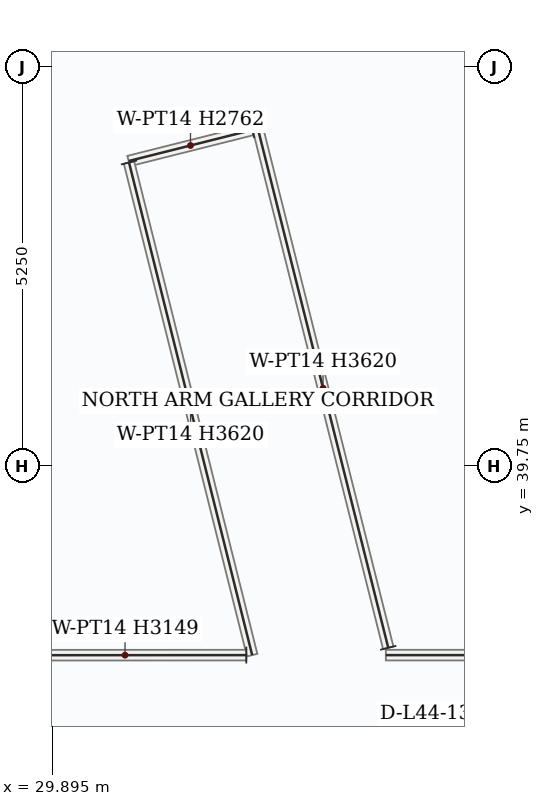
"""IFC4 building model, lengths in metres.
Left out: names, types, materials, properties, quantities, classifications, styles, units other than length and angle.
Written with IfcOpenShell. Run it as: python <this file> out.ifc"""

import sys

from ifc_helpers import new_model, si_unit, direction, frame, frame_2d, origin, place, context, subcontext, project, spatial, rectangle, extrude, source, transform, mapped, element, save


model = new_model("IFC4")
c1 = context("Model", 3, precision=1e-05, world=origin(), true_north=direction((0.0, 1.0)))
c2 = subcontext(c1, "Body", "Model", "MODEL_VIEW")
j1 = project(units=[si_unit("LENGTHUNIT", "METRE"), si_unit("PLANEANGLEUNIT", "RADIAN")], contexts=[c1])
p1 = place(None, origin())
s1 = spatial("IfcSite", under=j1, at=p1, CompositionType="ELEMENT")
p2 = place(p1, origin())
s2 = spatial("IfcBuilding", under=s1, at=p2, CompositionType="ELEMENT")
p3 = place(p2, frame((0.0, 0.0, 190.2)))
s3 = spatial("IfcBuildingStorey", under=s2, at=p3, CompositionType="ELEMENT", Elevation=190.2)
p4 = place(p3, frame((42.088, 37.26, 0.0), z_axis=(0.0, 0.0, 1.0), x_axis=(-1.0, 0.0, 0.0)))
e1 = element("IfcWall", 1, at=p4, inside=s3, PredefinedType="PARTITIONING", context=c2, shape_type="SweptSolid", body=[
    extrude(rectangle(XDim=7.806, YDim=0.14, at=frame_2d((3.903, 0.0))), origin(), (0.0, 0.0, 1.0), 3.62),
])
p5 = place(p4, frame((5.348, 0.0, 0.0)))
e2 = element("IfcOpeningElement", 2, at=p5, cuts=e1, PredefinedType="OPENING", context=c2, shape_type="SweptSolid", body=[
    extrude(rectangle(XDim=0.95, YDim=2.15, at=frame_2d((0.475, 1.075))), frame((0.0, 0.08, 0.0), z_axis=(0.0, -1.0, 0.0), x_axis=(1.0, 0.0, 0.0)), (0.0, 0.0, 1.0), 0.16),
])
m1 = source(origin(), c2, "Body", "SweptSolid", [
    extrude(rectangle(XDim=7.043, YDim=0.14, at=frame_2d((3.521, 0.0))), origin(), (0.0, 0.0, 1.0), 3.62),
])
p6 = place(p3, frame((34.313, 37.356, 0.0), z_axis=(0.0, 0.0, 1.0), x_axis=(-0.243587652837, 0.969878886968, 0.0)))
e3 = element("IfcWall", 3, at=p6, inside=s3, PredefinedType="PARTITIONING", context=c2, shape_type="MappedRepresentation", body=[
    mapped(m1, transform((0.0, 0.0, 0.0), x_axis=(1.0, 0.0, 0.0), y_axis=(0.0, 1.0, 0.0), z_axis=(0.0, 0.0, 1.0), scale=1.0)),
])
m2 = source(origin(), c2, "Body", "SweptSolid", [
    extrude(rectangle(XDim=1.678, YDim=0.14, at=frame_2d((0.839, 0.0))), origin(), (0.0, 0.0, 1.0), 2.762),
])
p7 = place(p3, frame((32.525, 44.169, 0.0), z_axis=(0.0, 0.0, 1.0), x_axis=(-0.969876563393, -0.243596904294, 0.0)))
e4 = element("IfcWall", 4, at=p7, inside=s3, PredefinedType="PARTITIONING", context=c2, shape_type="MappedRepresentation", body=[
    mapped(m2, transform((0.0, 0.0, 0.0), x_axis=(1.0, 0.0, 0.0), y_axis=(0.0, 1.0, 0.0), z_axis=(0.0, 0.0, 1.0), scale=1.0)),
])
m3 = source(origin(), c2, "Body", "SweptSolid", [
    extrude(rectangle(XDim=6.681, YDim=0.14, at=frame_2d((3.34, 0.0))), origin(), (0.0, 0.0, 1.0), 3.62),
])
p8 = place(p3, frame((30.903, 43.741, 0.0), z_axis=(0.0, 0.0, 1.0), x_axis=(0.242544223675, -0.970140350445, 0.0)))
e5 = element("IfcWall", 5, at=p8, inside=s3, PredefinedType="PARTITIONING", context=c2, shape_type="MappedRepresentation", body=[
    mapped(m3, transform((0.0, 0.0, 0.0), x_axis=(1.0, 0.0, 0.0), y_axis=(0.0, 1.0, 0.0), z_axis=(0.0, 0.0, 1.0), scale=1.0)),
])
m4 = source(origin(), c2, "Body", "SweptSolid", [
    extrude(rectangle(XDim=3.191, YDim=0.14, at=frame_2d((1.595, 0.0))), origin(), (0.0, 0.0, 1.0), 3.149),
])
p9 = place(p3, frame((32.446, 37.26, 0.0), z_axis=(0.0, 0.0, 1.0), x_axis=(-0.999999926826, -0.000382555443, 0.0)))
e6 = element("IfcWall", 6, at=p9, inside=s3, PredefinedType="PARTITIONING", context=c2, shape_type="MappedRepresentation", body=[
    mapped(m4, transform((0.0, 0.0, 0.0), x_axis=(1.0, 0.0, 0.0), y_axis=(0.0, 1.0, 0.0), z_axis=(0.0, 0.0, 1.0), scale=1.0)),
])
save(model, sys.argv[1])
